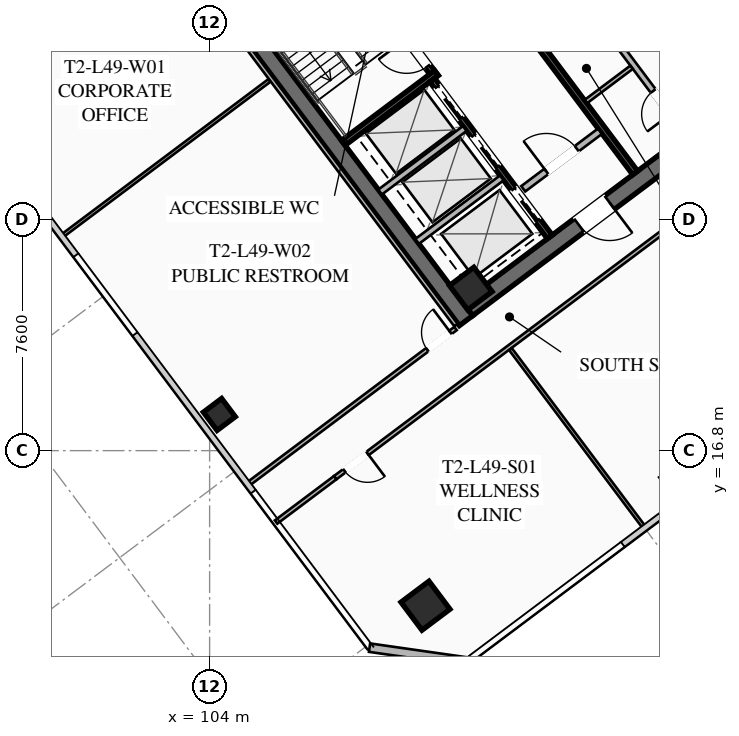
"""IFC4 building model, lengths in metres.
Left out: names, types, materials, properties, quantities, classifications, styles, units other than length and angle.
Written with IfcOpenShell. Run it as: python <this file> out.ifc"""

import sys

from ifc_helpers import new_model, si_unit, direction, frame, frame_2d, origin, origin_2d, place, context, subcontext, project, spatial, rectangle, hollow_rectangle, extrude, element, fill, save


model = new_model("IFC4")
c1 = context("Model", 3, precision=1e-05, world=origin(), true_north=direction((0.0, 1.0)))
c2 = subcontext(c1, "Body", "Model", "MODEL_VIEW")
j1 = project(units=[si_unit("LENGTHUNIT", "METRE"), si_unit("PLANEANGLEUNIT", "RADIAN")], contexts=[c1])
p1 = place(None, origin())
s1 = spatial("IfcSite", under=j1, at=p1, CompositionType="ELEMENT")
p2 = place(p1, origin())
s2 = spatial("IfcBuilding", under=s1, at=p2, CompositionType="ELEMENT")
p3 = place(p2, frame((0.0, 0.0, 181.85)))
s3 = spatial("IfcBuildingStorey", under=s2, at=p3, CompositionType="ELEMENT", Elevation=181.85)
p4 = place(p3, frame((112.436, 21.077, 0.0), z_axis=(0.0, 0.0, 1.0), x_axis=(-0.600005007985, 0.799996243986, 0.0)))
e1 = element("IfcWall", 1, at=p4, inside=s3, PredefinedType="SHEAR", context=c2, shape_type="SweptSolid", body=[
    extrude(rectangle(XDim=15.6, YDim=0.55, at=frame_2d((7.8, 0.0))), origin(), (0.0, 0.0, 1.0), 3.55),
])
p5 = place(p3, frame((124.539, 30.498, 0.0), z_axis=(0.0, 0.0, 1.0), x_axis=(-0.799998054672, -0.600002593761, 0.0)))
e2 = element("IfcWall", 2, at=p5, inside=s3, PredefinedType="SHEAR", context=c2, shape_type="SweptSolid", body=[
    extrude(rectangle(XDim=15.06, YDim=0.55, at=frame_2d((7.53, 0.0))), origin(), (0.0, 0.0, 1.0), 3.55),
])
p6 = place(p5, frame((9.23, 0.0, 0.0)))
e3 = element("IfcOpeningElement", 3, at=p6, cuts=e2, PredefinedType="OPENING", context=c2, shape_type="SweptSolid", body=[
    extrude(rectangle(XDim=1.25, YDim=2.25, at=frame_2d((0.625, 1.125))), frame((0.0, 0.285, 0.0), z_axis=(0.0, -1.0, 0.0), x_axis=(1.0, 0.0, 0.0)), (0.0, 0.0, 1.0), 0.57),
])
p7 = place(p5, frame((4.18, 0.0, 0.0)))
e4 = element("IfcOpeningElement", 4, at=p7, cuts=e2, PredefinedType="OPENING", context=c2, shape_type="SweptSolid", body=[
    extrude(rectangle(XDim=1.25, YDim=2.25, at=frame_2d((0.625, 1.125))), frame((0.0, 0.285, 0.0), z_axis=(0.0, -1.0, 0.0), x_axis=(1.0, 0.0, 0.0)), (0.0, 0.0, 1.0), 0.57),
])
p8 = place(p3, frame((112.59, 22.13, 0.0), z_axis=(0.0, 0.0, 1.0), x_axis=(0.799999996291, 0.600000004945, 0.0)))
e5 = element("IfcColumn", 5, at=p8, inside=s3, PredefinedType="COLUMN", context=c2, shape_type="SweptSolid", body=[
    extrude(hollow_rectangle(XDim=1.0, YDim=1.0, WallThickness=0.04, at=origin_2d()), origin(), (0.0, 0.0, 1.0), 3.37),
])
p9 = place(p3, frame((111.1, 11.7, 0.0), z_axis=(0.0, 0.0, 1.0), x_axis=(0.799999996291, 0.600000004945, 0.0)))
e6 = element("IfcColumn", 6, at=p9, inside=s3, PredefinedType="COLUMN", context=c2, shape_type="SweptSolid", body=[
    extrude(hollow_rectangle(XDim=1.15, YDim=1.15, WallThickness=0.045, at=origin_2d()), origin(), (0.0, 0.0, 1.0), 3.37),
])
p10 = place(p3, frame((104.32, 17.99, 0.0), z_axis=(0.0, 0.0, 1.0), x_axis=(0.799999996291, 0.600000004945, 0.0)))
e7 = element("IfcColumn", 7, at=p10, inside=s3, PredefinedType="COLUMN", context=c2, shape_type="SweptSolid", body=[
    extrude(hollow_rectangle(XDim=0.75, YDim=0.75, WallThickness=0.032, at=origin_2d()), origin(), (0.0, 0.0, 1.0), 3.37),
])
p11 = place(p3, frame((112.48, 9.86, 0.0), z_axis=(0.0, 0.0, 1.0), x_axis=(-0.989950994782, 0.141410847992, 0.0)))
e8 = element("IfcWall", 8, at=p11, inside=s3, PredefinedType="SOLIDWALL", context=c2, shape_type="SweptSolid", body=[
    extrude(rectangle(XDim=3.253, YDim=0.28, at=frame_2d((1.626, 0.0))), origin(), (0.0, 0.0, 1.0), 3.37),
])
p12 = place(p3, frame((111.44, 29.08, 0.0), z_axis=(0.0, 0.0, 1.0), x_axis=(-0.59999029481, 0.8000072788, 0.0)))
e9 = element("IfcWall", 9, at=p12, inside=s3, PredefinedType="SHEAR", context=c2, shape_type="SweptSolid", body=[
    extrude(rectangle(XDim=8.05, YDim=0.2, at=frame_2d((4.025, 0.0))), origin(), (0.0, 0.0, 1.0), 3.37),
])
p13 = place(p12, frame((0.45, 0.0, 0.0)))
e10 = element("IfcOpeningElement", 10, at=p13, cuts=e9, PredefinedType="OPENING", context=c2, shape_type="SweptSolid", body=[
    extrude(rectangle(XDim=1.15, YDim=2.2, at=frame_2d((0.575, 1.1))), frame((0.0, 0.11, 0.0), z_axis=(0.0, -1.0, 0.0), x_axis=(1.0, 0.0, 0.0)), (0.0, 0.0, 1.0), 0.22),
])
p14 = place(p3, frame((108.396, 26.922, 0.0), z_axis=(0.0, 0.0, 1.0), x_axis=(0.800015298837, 0.599979601008, 0.0)))
e11 = element("IfcWall", 11, at=p14, inside=s3, PredefinedType="SHEAR", context=c2, shape_type="SweptSolid", body=[
    extrude(rectangle(XDim=3.83, YDim=0.2, at=frame_2d((1.915, 0.0))), origin(), (0.0, 0.0, 1.0), 3.37),
])
p15 = place(p3, frame((116.56, 34.92, 0.0), z_axis=(0.0, 0.0, 1.0), x_axis=(0.59999029481, -0.8000072788, 0.0)))
e12 = element("IfcWall", 12, at=p15, inside=s3, PredefinedType="SHEAR", context=c2, shape_type="SweptSolid", body=[
    extrude(rectangle(XDim=8.05, YDim=0.2, at=frame_2d((4.025, 0.0))), origin(), (0.0, 0.0, 1.0), 3.37),
])
p16 = place(p15, frame((0.45, 0.0, 0.0)))
e13 = element("IfcOpeningElement", 13, at=p16, cuts=e12, PredefinedType="OPENING", context=c2, shape_type="SweptSolid", body=[
    extrude(rectangle(XDim=1.15, YDim=2.2, at=frame_2d((0.575, 1.1))), frame((0.0, 0.11, 0.0), z_axis=(0.0, -1.0, 0.0), x_axis=(1.0, 0.0, 0.0)), (0.0, 0.0, 1.0), 0.22),
])
p17 = place(p3, frame((117.998, 25.936, 0.0), z_axis=(0.0, 0.0, 1.0), x_axis=(-0.600002693989, 0.799997979501, 0.0)))
e14 = element("IfcWall", 14, at=p17, inside=s3, PredefinedType="SHEAR", context=c2, shape_type="SweptSolid", body=[
    extrude(rectangle(XDim=14.5, YDim=0.2, at=frame_2d((7.25, 0.0))), origin(), (0.0, 0.0, 1.0), 3.37),
])
p18 = place(p3, frame((114.316, 25.412, 0.0), z_axis=(0.0, 0.0, 1.0), x_axis=(0.800018601094, 0.59997519774, 0.0)))
e15 = element("IfcWall", 15, at=p18, inside=s3, PredefinedType="SOLIDWALL", context=c2, shape_type="SweptSolid", body=[
    extrude(rectangle(XDim=3.15, YDim=0.22, at=frame_2d((1.575, 0.0))), origin(), (0.0, 0.0, 1.0), 2.723),
])
p19 = place(p18, frame((0.95, 0.0, 0.0)))
e16 = element("IfcOpeningElement", 16, at=p19, cuts=e15, PredefinedType="OPENING", context=c2, shape_type="SweptSolid", body=[
    extrude(rectangle(XDim=1.25, YDim=2.25, at=frame_2d((0.625, 1.125))), frame((0.0, 0.12, 0.0), z_axis=(0.0, -1.0, 0.0), x_axis=(1.0, 0.0, 0.0)), (0.0, 0.0, 1.0), 0.24),
])
p20 = place(p3, frame((115.19, 23.83, 0.0), z_axis=(0.0, 0.0, 1.0), x_axis=(-0.599993943644, 0.800004542231, 0.0)))
e17 = element("IfcWall", 17, at=p20, inside=s3, PredefinedType="SHEAR", context=c2, shape_type="SweptSolid", body=[
    extrude(rectangle(XDim=6.45, YDim=0.2, at=frame_2d((3.225, 0.0))), origin(), (0.0, 0.0, 1.0), 3.37),
])
p21 = place(p20, frame((4.875, 0.0, 0.0)))
e18 = element("IfcOpeningElement", 18, at=p21, cuts=e17, PredefinedType="OPENING", context=c2, shape_type="SweptSolid", body=[
    extrude(rectangle(XDim=1.3, YDim=2.25, at=frame_2d((0.65, 1.125))), frame((0.0, 0.11, 0.0), z_axis=(0.0, -1.0, 0.0), x_axis=(1.0, 0.0, 0.0)), (0.0, 0.0, 1.0), 0.22),
])
p22 = place(p20, frame((2.875, 0.0, 0.0)))
e19 = element("IfcOpeningElement", 19, at=p22, cuts=e17, PredefinedType="OPENING", context=c2, shape_type="SweptSolid", body=[
    extrude(rectangle(XDim=1.3, YDim=2.25, at=frame_2d((0.65, 1.125))), frame((0.0, 0.11, 0.0), z_axis=(0.0, -1.0, 0.0), x_axis=(1.0, 0.0, 0.0)), (0.0, 0.0, 1.0), 0.22),
])
p23 = place(p20, frame((0.675, 0.0, 0.0)))
e20 = element("IfcOpeningElement", 20, at=p23, cuts=e17, PredefinedType="OPENING", context=c2, shape_type="SweptSolid", body=[
    extrude(rectangle(XDim=1.3, YDim=2.25, at=frame_2d((0.65, 1.125))), frame((0.0, 0.11, 0.0), z_axis=(0.0, -1.0, 0.0), x_axis=(1.0, 0.0, 0.0)), (0.0, 0.0, 1.0), 0.22),
])
for number, where, z_axis, x_axis in (
    (21, (110.826, 23.682, 0.0), (0.0, 0.0, 1.0), (0.8, 0.6, 0.0)),
    (22, (109.608, 25.306, 0.0), (0.0, 0.0, 1.0), (0.8, 0.6, 0.0)),
):
    element("IfcWall", number, at=place(p3, frame(where, z_axis=z_axis, x_axis=x_axis)), inside=s3, PredefinedType="SOLIDWALL", context=c2, shape_type="SweptSolid", body=[
        extrude(rectangle(XDim=3.48, YDim=0.2, at=frame_2d((1.74, 0.0))), origin(), (0.0, 0.0, 1.0), 3.37),
    ])
p24 = place(p3, frame((119.67, 27.19, 0.0), z_axis=(0.0, 0.0, 1.0), x_axis=(-0.599988677396, 0.800008491828, 0.0)))
e23 = element("IfcWall", 23, at=p24, inside=s3, PredefinedType="SOLIDWALL", context=c2, shape_type="SweptSolid", body=[
    extrude(rectangle(XDim=6.9, YDim=0.2, at=frame_2d((3.45, 0.0))), origin(), (0.0, 0.0, 1.0), 2.723),
])
p25 = place(p24, frame((0.85, 0.0, 0.0)))
e24 = element("IfcOpeningElement", 24, at=p25, cuts=e23, PredefinedType="OPENING", context=c2, shape_type="SweptSolid", body=[
    extrude(rectangle(XDim=0.95, YDim=2.05, at=frame_2d((0.475, 1.025))), frame((0.0, 0.11, 0.0), z_axis=(0.0, -1.0, 0.0), x_axis=(1.0, 0.0, 0.0)), (0.0, 0.0, 1.0), 0.22),
])
p26 = place(p24, frame((4.8, 0.0, 0.0)))
e25 = element("IfcOpeningElement", 25, at=p26, cuts=e23, PredefinedType="OPENING", context=c2, shape_type="SweptSolid", body=[
    extrude(rectangle(XDim=1.05, YDim=2.2, at=frame_2d((0.525, 1.1))), frame((0.0, 0.11, 0.0), z_axis=(0.0, -1.0, 0.0), x_axis=(1.0, 0.0, 0.0)), (0.0, 0.0, 1.0), 0.22),
])
p27 = place(p3, frame((116.376, 28.282, 0.0), z_axis=(0.0, 0.0, 1.0), x_axis=(0.8, 0.6, 0.0)))
e26 = element("IfcWall", 26, at=p27, inside=s3, PredefinedType="PARTITIONING", context=c2, shape_type="SweptSolid", body=[
    extrude(rectangle(XDim=1.88, YDim=0.135, at=frame_2d((0.94, 0.0))), origin(), (0.0, 0.0, 1.0), 2.723),
])
p28 = place(p3, frame((131.09, 33.13, 0.0), z_axis=(0.0, 0.0, 1.0), x_axis=(-0.800003062365, -0.599995916825, 0.0)))
e27 = element("IfcWall", 27, at=p28, inside=s3, PredefinedType="PARTITIONING", context=c2, shape_type="SweptSolid", body=[
    extrude(rectangle(XDim=28.7, YDim=0.135, at=frame_2d((14.35, 0.0))), origin(), (0.0, 0.0, 1.0), 2.723),
])
p29 = place(p28, frame((27.37, 0.0, 0.0)))
e28 = element("IfcOpeningElement", 28, at=p29, cuts=e27, PredefinedType="OPENING", context=c2, shape_type="SweptSolid", body=[
    extrude(rectangle(XDim=0.95, YDim=2.05, at=frame_2d((0.475, 1.025))), frame((0.0, 0.077, 0.0), z_axis=(0.0, -1.0, 0.0), x_axis=(1.0, 0.0, 0.0)), (0.0, 0.0, 1.0), 0.155),
])
p30 = place(p28, frame((0.38, 0.0, 0.0)))
e29 = element("IfcOpeningElement", 29, at=p30, cuts=e27, PredefinedType="OPENING", context=c2, shape_type="SweptSolid", body=[
    extrude(rectangle(XDim=0.95, YDim=2.05, at=frame_2d((0.475, 1.025))), frame((0.0, 0.077, 0.0), z_axis=(0.0, -1.0, 0.0), x_axis=(1.0, 0.0, 0.0)), (0.0, 0.0, 1.0), 0.155),
])
p31 = place(p3, frame((106.186, 14.452, 0.0), z_axis=(0.0, 0.0, 1.0), x_axis=(0.799975885537, 0.600032151272, 0.0)))
e30 = element("IfcWall", 30, at=p31, inside=s3, PredefinedType="PARTITIONING", context=c2, shape_type="SweptSolid", body=[
    extrude(rectangle(XDim=2.43, YDim=0.135, at=frame_2d((1.215, 0.0))), origin(), (0.0, 0.0, 1.0), 2.723),
])
p32 = place(p3, frame((118.308, 14.256, 0.0), z_axis=(0.0, 0.0, 1.0), x_axis=(-0.600021258292, 0.79998405584, 0.0)))
e31 = element("IfcWall", 31, at=p32, inside=s3, PredefinedType="PARTITIONING", context=c2, shape_type="SweptSolid", body=[
    extrude(rectangle(XDim=7.35, YDim=0.11, at=frame_2d((3.675, 0.0))), origin(), (0.0, 0.0, 1.0), 2.723),
])
p33 = place(p3, frame((112.104, 20.928, 0.0), z_axis=(0.0, 0.0, 1.0), x_axis=(-0.599994940075, 0.800003794918, 0.0)))
e32 = element("IfcWall", 32, at=p33, inside=s3, PredefinedType="PARTITIONING", context=c2, shape_type="SweptSolid", body=[
    extrude(rectangle(XDim=15.44, YDim=0.135, at=frame_2d((7.72, 0.0))), origin(), (0.0, 0.0, 1.0), 2.723),
])
p34 = place(p3, frame((102.728, 33.296, 0.0), z_axis=(0.0, 0.0, 1.0), x_axis=(-0.800013722153, -0.59998170336, 0.0)))
e33 = element("IfcWall", 33, at=p34, inside=s3, PredefinedType="PARTITIONING", context=c2, shape_type="SweptSolid", body=[
    extrude(rectangle(XDim=8.54, YDim=0.135, at=frame_2d((4.27, 0.0))), origin(), (0.0, 0.0, 1.0), 2.723),
])
p35 = place(p34, frame((0.5, 0.0, 0.0)))
e34 = element("IfcOpeningElement", 34, at=p35, cuts=e33, PredefinedType="OPENING", context=c2, shape_type="SweptSolid", body=[
    extrude(rectangle(XDim=0.95, YDim=2.05, at=frame_2d((0.475, 1.025))), frame((0.0, 0.077, 0.0), z_axis=(0.0, -1.0, 0.0), x_axis=(1.0, 0.0, 0.0)), (0.0, 0.0, 1.0), 0.155),
])
p36 = place(p3, frame((105.256, 15.692, 0.0), z_axis=(0.0, 0.0, 1.0), x_axis=(0.799989708052, 0.600013722352, 0.0)))
e35 = element("IfcWall", 35, at=p36, inside=s3, PredefinedType="PARTITIONING", context=c2, shape_type="SweptSolid", body=[
    extrude(rectangle(XDim=8.54, YDim=0.135, at=frame_2d((4.27, 0.0))), origin(), (0.0, 0.0, 1.0), 2.723),
])
p37 = place(p36, frame((7.38, 0.0, 0.0)))
e36 = element("IfcOpeningElement", 36, at=p37, cuts=e35, PredefinedType="OPENING", context=c2, shape_type="SweptSolid", body=[
    extrude(rectangle(XDim=0.95, YDim=2.05, at=frame_2d((0.475, 1.025))), frame((0.0, 0.077, 0.0), z_axis=(0.0, -1.0, 0.0), x_axis=(1.0, 0.0, 0.0)), (0.0, 0.0, 1.0), 0.155),
])
p38 = place(p3, frame((99.136, 23.852, 0.0), z_axis=(0.0, 0.0, 1.0), x_axis=(0.8, 0.6, 0.0)))
e37 = element("IfcWall", 37, at=p38, inside=s3, PredefinedType="PARTITIONING", context=c2, shape_type="SweptSolid", body=[
    extrude(rectangle(XDim=8.54, YDim=0.11, at=frame_2d((4.27, 0.0))), origin(), (0.0, 0.0, 1.0), 2.723),
])
p39 = place(p6, origin())
e38 = element("IfcDoor", 38, at=p39, inside=s3, OperationType="SINGLE_SWING_LEFT", PredefinedType="DOOR", context=c2, shape_type="SweptSolid", body=[
    extrude(rectangle(XDim=1.25, YDim=2.25, at=frame_2d((0.625, 1.125))), frame((0.0, 0.025, 0.0), z_axis=(0.0, -1.0, 0.0), x_axis=(1.0, 0.0, 0.0)), (0.0, 0.0, 1.0), 0.05),
])
fill(e3, e38)
p40 = place(p13, origin())
e39 = element("IfcDoor", 39, at=p40, inside=s3, OperationType="SINGLE_SWING_RIGHT", PredefinedType="DOOR", context=c2, shape_type="SweptSolid", body=[
    extrude(rectangle(XDim=1.15, YDim=2.2, at=frame_2d((0.575, 1.1))), frame((0.0, 0.025, 0.0), z_axis=(0.0, -1.0, 0.0), x_axis=(1.0, 0.0, 0.0)), (0.0, 0.0, 1.0), 0.05),
])
fill(e10, e39)
p41 = place(p19, origin())
e40 = element("IfcDoor", 40, at=p41, inside=s3, OperationType="SINGLE_SWING_LEFT", PredefinedType="DOOR", context=c2, shape_type="SweptSolid", body=[
    extrude(rectangle(XDim=1.25, YDim=2.25, at=frame_2d((0.625, 1.125))), frame((0.0, 0.025, 0.0), z_axis=(0.0, -1.0, 0.0), x_axis=(1.0, 0.0, 0.0)), (0.0, 0.0, 1.0), 0.05),
])
fill(e16, e40)
p42 = place(p25, origin())
e41 = element("IfcDoor", 41, at=p42, inside=s3, OperationType="SINGLE_SWING_LEFT", PredefinedType="DOOR", context=c2, shape_type="SweptSolid", body=[
    extrude(rectangle(XDim=0.95, YDim=2.05, at=frame_2d((0.475, 1.025))), frame((0.0, 0.025, 0.0), z_axis=(0.0, -1.0, 0.0), x_axis=(1.0, 0.0, 0.0)), (0.0, 0.0, 1.0), 0.05),
])
fill(e24, e41)
p43 = place(p29, origin())
e42 = element("IfcDoor", 42, at=p43, inside=s3, OperationType="SINGLE_SWING_LEFT", PredefinedType="DOOR", context=c2, shape_type="SweptSolid", body=[
    extrude(rectangle(XDim=0.95, YDim=2.05, at=frame_2d((0.475, 1.025))), frame((0.0, 0.025, 0.0), z_axis=(0.0, -1.0, 0.0), x_axis=(1.0, 0.0, 0.0)), (0.0, 0.0, 1.0), 0.05),
])
fill(e28, e42)
p44 = place(p37, origin())
e43 = element("IfcDoor", 43, at=p44, inside=s3, OperationType="SINGLE_SWING_RIGHT", PredefinedType="DOOR", context=c2, shape_type="SweptSolid", body=[
    extrude(rectangle(XDim=0.95, YDim=2.05, at=frame_2d((0.475, 1.025))), frame((0.0, 0.025, 0.0), z_axis=(0.0, -1.0, 0.0), x_axis=(1.0, 0.0, 0.0)), (0.0, 0.0, 1.0), 0.05),
])
fill(e36, e43)
p45 = place(p21, origin())
e44 = element("IfcDoor", 44, at=p45, inside=s3, OperationType="SLIDING_TO_LEFT", PredefinedType="DOOR", context=c2, shape_type="SweptSolid", body=[
    extrude(rectangle(XDim=1.3, YDim=2.25, at=frame_2d((0.65, 1.125))), frame((0.0, 0.025, 0.0), z_axis=(0.0, -1.0, 0.0), x_axis=(1.0, 0.0, 0.0)), (0.0, 0.0, 1.0), 0.05),
])
fill(e18, e44)
p46 = place(p22, origin())
e45 = element("IfcDoor", 45, at=p46, inside=s3, OperationType="SLIDING_TO_LEFT", PredefinedType="DOOR", context=c2, shape_type="SweptSolid", body=[
    extrude(rectangle(XDim=1.3, YDim=2.25, at=frame_2d((0.65, 1.125))), frame((0.0, 0.025, 0.0), z_axis=(0.0, -1.0, 0.0), x_axis=(1.0, 0.0, 0.0)), (0.0, 0.0, 1.0), 0.05),
])
fill(e19, e45)
p47 = place(p23, origin())
e46 = element("IfcDoor", 46, at=p47, inside=s3, OperationType="SLIDING_TO_LEFT", PredefinedType="DOOR", context=c2, shape_type="SweptSolid", body=[
    extrude(rectangle(XDim=1.3, YDim=2.25, at=frame_2d((0.65, 1.125))), frame((0.0, 0.025, 0.0), z_axis=(0.0, -1.0, 0.0), x_axis=(1.0, 0.0, 0.0)), (0.0, 0.0, 1.0), 0.05),
])
fill(e20, e46)
save(model, sys.argv[1])
